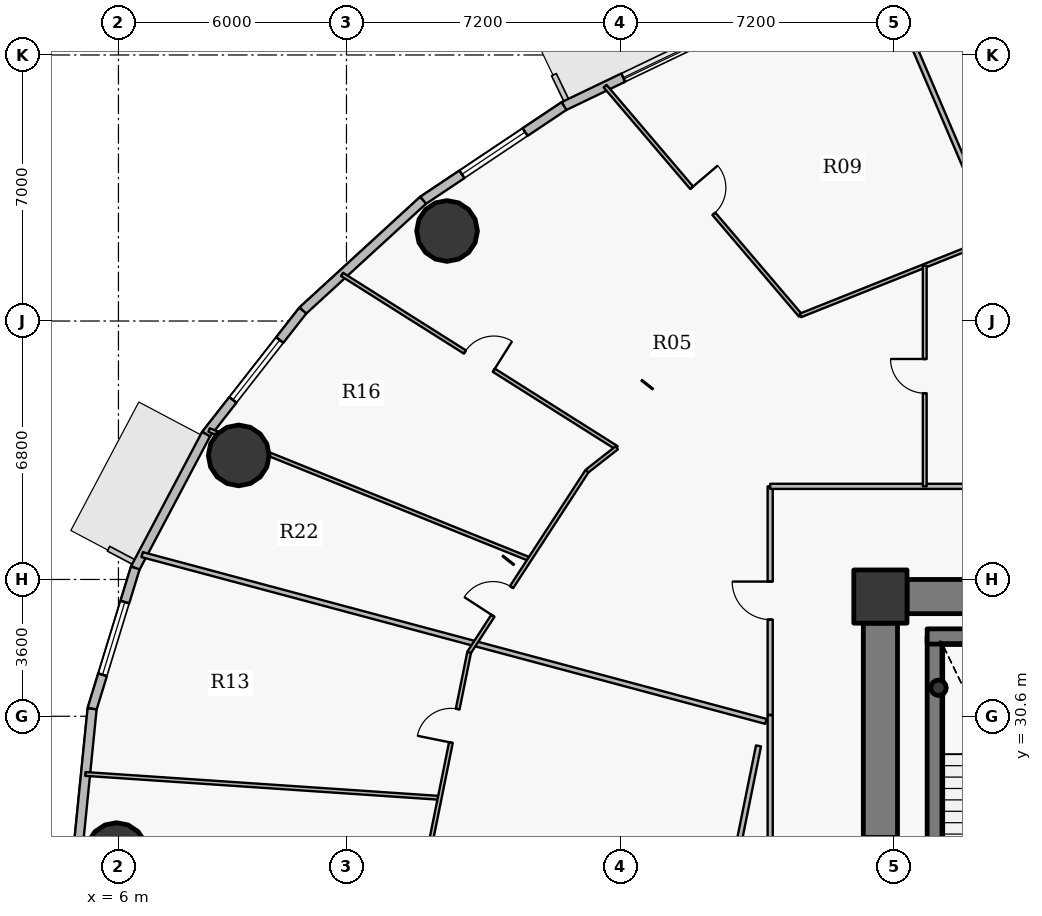
"""IFC4 building model, lengths in metres.
Left out: names, types, materials, properties, quantities, classifications, styles, units other than length and angle.
Written with IfcOpenShell. Run it as: python <this file> out.ifc"""

import sys

from ifc_helpers import new_model, si_unit, direction, frame, frame_2d, origin, origin_2d, place, context, subcontext, project, spatial, rectangle, hollow_circle, extrude, source, transform, mapped, element, fill, save


model = new_model("IFC4")
c1 = context("Model", 3, precision=1e-05, world=origin(), true_north=direction((0.0, 1.0)))
c2 = subcontext(c1, "Body", "Model", "MODEL_VIEW")
j1 = project(units=[si_unit("LENGTHUNIT", "METRE"), si_unit("PLANEANGLEUNIT", "RADIAN")], contexts=[c1])
p1 = place(None, origin())
s1 = spatial("IfcSite", under=j1, at=p1, CompositionType="ELEMENT")
p2 = place(p1, origin())
s2 = spatial("IfcBuilding", under=s1, at=p2, CompositionType="ELEMENT")
p3 = place(p2, frame((0.0, 0.0, 70.2)))
s3 = spatial("IfcBuildingStorey", under=s2, at=p3, CompositionType="ELEMENT", Elevation=70.2)
p4 = place(p3, frame((26.05, 33.75, 0.0), z_axis=(0.0, 0.0, 1.0), x_axis=(1.0, 0.0, 0.0)))
e1 = element("IfcColumn", 1, at=p4, inside=s3, PredefinedType="COLUMN", context=c2, shape_type="SweptSolid", body=[
    extrude(rectangle(XDim=1.4, YDim=1.4, at=origin_2d()), origin(), (0.0, 0.0, 1.0), 4.2),
])
p5 = place(p3, frame((27.48, 24.1, 0.0), z_axis=(0.0, 0.0, 1.0), x_axis=(0.0, 1.0, 0.0)))
e2 = element("IfcWall", 2, at=p5, inside=s3, PredefinedType="SHEAR", context=c2, shape_type="SweptSolid", body=[
    extrude(rectangle(XDim=8.6, YDim=0.4, at=frame_2d((4.3, 0.0))), origin(), (0.0, 0.0, 1.0), 4.2),
])
p6 = place(p3, frame((27.28, 32.7, 0.0), z_axis=(0.0, 0.0, 1.0), x_axis=(1.0, 0.0, 0.0)))
e3 = element("IfcWall", 3, at=p6, inside=s3, PredefinedType="SHEAR", context=c2, shape_type="SweptSolid", body=[
    extrude(rectangle(XDim=4.1, YDim=0.4, at=frame_2d((2.05, 0.0))), origin(), (0.0, 0.0, 1.0), 4.2),
])
p7 = place(p3, frame((27.58, 31.35, 0.0), z_axis=(0.0, 0.0, 1.0), x_axis=(1.0, 0.0, 0.0)))
e4 = element("IfcColumn", 4, at=p7, inside=s3, PredefinedType="COLUMN", context=c2, shape_type="SweptSolid", body=[
    extrude(hollow_circle(Radius=0.203, WallThickness=0.016, at=origin_2d()), origin(), (0.0, 0.0, 1.0), 4.2),
])
p8 = place(p3, frame((26.75, 33.75, 0.0), z_axis=(0.0, 0.0, 1.0), x_axis=(1.0, 0.0, 0.0)))
e5 = element("IfcWall", 5, at=p8, inside=s3, PredefinedType="SHEAR", context=c2, shape_type="SweptSolid", body=[
    extrude(rectangle(XDim=18.5, YDim=0.9, at=frame_2d((9.25, 0.0))), origin(), (0.0, 0.0, 1.0), 3.4),
])
p9 = place(p3, frame((26.05, 20.95, 0.0), z_axis=(0.0, 0.0, 1.0), x_axis=(0.0, 1.0, 0.0)))
e6 = element("IfcWall", 6, at=p9, inside=s3, PredefinedType="SHEAR", context=c2, shape_type="SweptSolid", body=[
    extrude(rectangle(XDim=12.1, YDim=0.9, at=frame_2d((6.05, 0.0))), origin(), (0.0, 0.0, 1.0), 3.4),
])
p10 = place(p9, frame((5.64, 0.0, 0.0)))
e7 = element("IfcOpeningElement", 7, at=p10, cuts=e6, PredefinedType="OPENING", context=c2, shape_type="SweptSolid", body=[
    extrude(rectangle(XDim=0.82, YDim=2.1, at=origin_2d()), frame((0.41, 0.46, 1.05), z_axis=(0.0, -1.0, 0.0), x_axis=(1.0, 0.0, 0.0)), (0.0, 0.0, 1.0), 0.92),
])
for number, where, z_axis, x_axis in (
    (8, (14.647, 43.369, 0.0), (0.0, 0.0, 1.0), (1.0, 0.0, 0.0)),
    (9, (9.165, 37.464, 0.0), (0.0, 0.0, 1.0), (1.0, 0.0, 0.0)),
    (10, (5.95, 27.0, 0.0), (0.0, 0.0, 1.0), (1.0, 0.0, 0.0)),
):
    element("IfcColumn", number, at=place(p3, frame(where, z_axis=z_axis, x_axis=x_axis)), inside=s3, PredefinedType="COLUMN", context=c2, shape_type="SweptSolid", body=[
        extrude(hollow_circle(Radius=0.8, WallThickness=0.045, at=origin_2d()), origin(), (0.0, 0.0, 1.0), 4.2),
    ])
p11 = place(p3, frame((17.723, 46.656, 0.0), z_axis=(0.0, 0.0, 1.0), x_axis=(0.901601503137, 0.432567601123, 0.0)))
e11 = element("IfcWall", 11, at=p11, inside=s3, PredefinedType="SOLIDWALL", context=c2, shape_type="SweptSolid", body=[
    extrude(rectangle(XDim=4.613, YDim=0.24, at=frame_2d((2.306, 0.0))), origin(), (0.0, 0.0, 1.0), 3.95),
])
p12 = place(p11, frame((1.731, 0.0, 0.9)))
e12 = element("IfcOpeningElement", 12, at=p12, cuts=e11, PredefinedType="OPENING", context=c2, shape_type="SweptSolid", body=[
    extrude(rectangle(XDim=2.0, YDim=1.75, at=origin_2d()), frame((1.0, 0.13, 0.875), z_axis=(0.0, -1.0, 0.0), x_axis=(1.0, 0.0, 0.0)), (0.0, 0.0, 1.0), 0.26),
])
p13 = place(p3, frame((14.015, 44.176, 0.0), z_axis=(0.0, 0.0, 1.0), x_axis=(0.831240982525, 0.555912249343, 0.0)))
e13 = element("IfcWall", 13, at=p13, inside=s3, PredefinedType="SOLIDWALL", context=c2, shape_type="SweptSolid", body=[
    extrude(rectangle(XDim=4.46, YDim=0.24, at=frame_2d((2.23, 0.0))), origin(), (0.0, 0.0, 1.0), 3.95),
])
p14 = place(p13, frame((1.23, 0.0, 0.9)))
e14 = element("IfcOpeningElement", 14, at=p14, cuts=e13, PredefinedType="OPENING", context=c2, shape_type="SweptSolid", body=[
    extrude(rectangle(XDim=2.0, YDim=1.75, at=origin_2d()), frame((1.0, 0.13, 0.875), z_axis=(0.0, -1.0, 0.0), x_axis=(1.0, 0.0, 0.0)), (0.0, 0.0, 1.0), 0.26),
])
p15 = place(p3, frame((10.85, 41.275, 0.0), z_axis=(0.0, 0.0, 1.0), x_axis=(0.737116376281, 0.67576582321, 0.0)))
e15 = element("IfcWall", 15, at=p15, inside=s3, PredefinedType="SOLIDWALL", context=c2, shape_type="SweptSolid", body=[
    extrude(rectangle(XDim=4.294, YDim=0.24, at=frame_2d((2.147, 0.0))), origin(), (0.0, 0.0, 1.0), 3.95),
])
p16 = place(p3, frame((8.305, 38.023, 0.0), z_axis=(0.0, 0.0, 1.0), x_axis=(0.616295508253, 0.787514981767, 0.0)))
e16 = element("IfcWall", 16, at=p16, inside=s3, PredefinedType="SOLIDWALL", context=c2, shape_type="SweptSolid", body=[
    extrude(rectangle(XDim=4.129, YDim=0.24, at=frame_2d((2.065, 0.0))), origin(), (0.0, 0.0, 1.0), 3.95),
])
p17 = place(p16, frame((1.146, 0.0, 0.9)))
e17 = element("IfcOpeningElement", 17, at=p17, cuts=e16, PredefinedType="OPENING", context=c2, shape_type="SweptSolid", body=[
    extrude(rectangle(XDim=2.0, YDim=1.75, at=origin_2d()), frame((1.0, 0.13, 0.875), z_axis=(0.0, -1.0, 0.0), x_axis=(1.0, 0.0, 0.0)), (0.0, 0.0, 1.0), 0.26),
])
p18 = place(p3, frame((6.442, 34.501, 0.0), z_axis=(0.0, 0.0, 1.0), x_axis=(0.467662443071, 0.883907144072, 0.0)))
e18 = element("IfcWall", 18, at=p18, inside=s3, PredefinedType="SOLIDWALL", context=c2, shape_type="SweptSolid", body=[
    extrude(rectangle(XDim=3.984, YDim=0.24, at=frame_2d((1.992, 0.0))), origin(), (0.0, 0.0, 1.0), 3.95),
])
p19 = place(p3, frame((5.307, 30.797, 0.0), z_axis=(0.0, 0.0, 1.0), x_axis=(0.293111631758, 0.956078224482, 0.0)))
e19 = element("IfcWall", 19, at=p19, inside=s3, PredefinedType="SOLIDWALL", context=c2, shape_type="SweptSolid", body=[
    extrude(rectangle(XDim=3.875, YDim=0.24, at=frame_2d((1.938, 0.0))), origin(), (0.0, 0.0, 1.0), 3.95),
])
p20 = place(p19, frame((0.938, 0.0, 0.9)))
e20 = element("IfcOpeningElement", 20, at=p20, cuts=e19, PredefinedType="OPENING", context=c2, shape_type="SweptSolid", body=[
    extrude(rectangle(XDim=2.0, YDim=1.75, at=origin_2d()), frame((1.0, 0.13, 0.875), z_axis=(0.0, -1.0, 0.0), x_axis=(1.0, 0.0, 0.0)), (0.0, 0.0, 1.0), 0.26),
])
p21 = place(p3, frame((4.925, 27.0, 0.0), z_axis=(0.0, 0.0, 1.0), x_axis=(0.099997795174, 0.994987658698, 0.0)))
e21 = element("IfcWall", 21, at=p21, inside=s3, PredefinedType="SOLIDWALL", context=c2, shape_type="SweptSolid", body=[
    extrude(rectangle(XDim=3.816, YDim=0.24, at=frame_2d((1.908, 0.0))), origin(), (0.0, 0.0, 1.0), 3.95),
])
p22 = place(p3, frame((5.129, 29.083, 0.0), z_axis=(0.0, 0.0, 1.0), x_axis=(0.997731551972, -0.067318275369, 0.0)))
e22 = element("IfcWall", 22, at=p22, inside=s3, PredefinedType="PARTITIONING", context=c2, shape_type="SweptSolid", body=[
    extrude(rectangle(XDim=9.346, YDim=0.1, at=frame_2d((4.673, 0.0))), origin(), (0.0, 0.0, 1.0), 3.335),
])
p23 = place(p3, frame((6.623, 34.854, 0.0), z_axis=(0.0, 0.0, 1.0), x_axis=(0.966073053026, -0.258268961003, 0.0)))
e23 = element("IfcWall", 23, at=p23, inside=s3, PredefinedType="PARTITIONING", context=c2, shape_type="SweptSolid", body=[
    extrude(rectangle(XDim=16.991, YDim=0.135, at=frame_2d((8.495, 0.0))), origin(), (0.0, 0.0, 1.0), 3.335),
])
p24 = place(p3, frame((8.385, 38.132, 0.0), z_axis=(0.0, 0.0, 1.0), x_axis=(0.927473750459, -0.373888275037, 0.0)))
e24 = element("IfcWall", 24, at=p24, inside=s3, PredefinedType="PARTITIONING", context=c2, shape_type="SweptSolid", body=[
    extrude(rectangle(XDim=9.096, YDim=0.1, at=frame_2d((4.548, 0.0))), origin(), (0.0, 0.0, 1.0), 3.285),
])
p25 = place(p3, frame((11.882, 42.228, 0.0), z_axis=(0.0, 0.0, 1.0), x_axis=(0.845549287721, -0.533897370319, 0.0)))
e25 = element("IfcWall", 25, at=p25, inside=s3, PredefinedType="PARTITIONING", context=c2, shape_type="SweptSolid", body=[
    extrude(rectangle(XDim=8.55, YDim=0.1, at=frame_2d((4.275, 0.0))), origin(), (0.0, 0.0, 1.0), 3.335),
])
p26 = place(p25, frame((3.825, 0.0, 0.0)))
e26 = element("IfcOpeningElement", 26, at=p26, cuts=e25, PredefinedType="OPENING", context=c2, shape_type="SweptSolid", body=[
    extrude(rectangle(XDim=0.9, YDim=2.1, at=origin_2d()), frame((0.45, 0.06, 1.05), z_axis=(0.0, -1.0, 0.0), x_axis=(1.0, 0.0, 0.0)), (0.0, 0.0, 1.0), 0.12),
])
p27 = place(p3, frame((14.16, 27.0, 0.0), z_axis=(0.0, 0.0, 1.0), x_axis=(0.198292702032, 0.980142848936, 0.0)))
e27 = element("IfcWall", 27, at=p27, inside=s3, PredefinedType="PARTITIONING", context=c2, shape_type="SweptSolid", body=[
    extrude(rectangle(XDim=5.392, YDim=0.1, at=frame_2d((2.696, 0.0))), origin(), (0.0, 0.0, 1.0), 3.285),
])
p28 = place(p27, frame((2.967, 0.0, 0.0)))
e28 = element("IfcOpeningElement", 28, at=p28, cuts=e27, PredefinedType="OPENING", context=c2, shape_type="SweptSolid", body=[
    extrude(rectangle(XDim=0.9, YDim=2.1, at=origin_2d()), frame((0.45, 0.06, 1.05), z_axis=(0.0, -1.0, 0.0), x_axis=(1.0, 0.0, 0.0)), (0.0, 0.0, 1.0), 0.12),
])
p29 = place(p3, frame((15.229, 32.284, 0.0), z_axis=(0.0, 0.0, 1.0), x_axis=(0.545394142426, 0.83817971188, 0.0)))
e29 = element("IfcWall", 29, at=p29, inside=s3, PredefinedType="PARTITIONING", context=c2, shape_type="SweptSolid", body=[
    extrude(rectangle(XDim=5.688, YDim=0.1, at=frame_2d((2.844, 0.0))), origin(), (0.0, 0.0, 1.0), 3.285),
])
p30 = place(p29, frame((1.146, 0.0, 0.0)))
e30 = element("IfcOpeningElement", 30, at=p30, cuts=e29, PredefinedType="OPENING", context=c2, shape_type="SweptSolid", body=[
    extrude(rectangle(XDim=0.9, YDim=2.1, at=origin_2d()), frame((0.45, 0.06, 1.05), z_axis=(0.0, -1.0, 0.0), x_axis=(1.0, 0.0, 0.0)), (0.0, 0.0, 1.0), 0.12),
])
p31 = place(p3, frame((18.331, 37.052, 0.0), z_axis=(0.0, 0.0, 1.0), x_axis=(0.787385450927, 0.616460989575, 0.0)))
e31 = element("IfcWall", 31, at=p31, inside=s3, PredefinedType="PARTITIONING", context=c2, shape_type="SweptSolid", body=[
    extrude(rectangle(XDim=0.991, YDim=0.1, at=frame_2d((0.496, 0.0))), origin(), (0.0, 0.0, 1.0), 3.435),
])
p32 = place(p3, frame((18.805, 47.181, 0.0), z_axis=(0.0, 0.0, 1.0), x_axis=(0.648556358155, -0.761166637667, 0.0)))
e32 = element("IfcWall", 32, at=p32, inside=s3, PredefinedType="PARTITIONING", context=c2, shape_type="SweptSolid", body=[
    extrude(rectangle(XDim=7.926, YDim=0.1, at=frame_2d((3.963, 0.0))), origin(), (0.0, 0.0, 1.0), 3.335),
])
p33 = place(p32, frame((3.513, 0.0, 0.0)))
e33 = element("IfcOpeningElement", 33, at=p33, cuts=e32, PredefinedType="OPENING", context=c2, shape_type="SweptSolid", body=[
    extrude(rectangle(XDim=0.9, YDim=2.1, at=origin_2d()), frame((0.45, 0.06, 1.05), z_axis=(0.0, -1.0, 0.0), x_axis=(1.0, 0.0, 0.0)), (0.0, 0.0, 1.0), 0.12),
])
p34 = place(p3, frame((23.15, 30.638, 0.0), z_axis=(0.0, 0.0, 1.0), x_axis=(0.0, 1.0, 0.0)))
e34 = element("IfcWall", 34, at=p34, inside=s3, PredefinedType="PARTITIONING", context=c2, shape_type="SweptSolid", body=[
    extrude(rectangle(XDim=6.011, YDim=0.135, at=frame_2d((3.006, 0.0))), origin(), (0.0, 0.0, 1.0), 3.285),
])
p35 = place(p34, frame((2.506, 0.0, 0.0)))
e35 = element("IfcOpeningElement", 35, at=p35, cuts=e34, PredefinedType="OPENING", context=c2, shape_type="SweptSolid", body=[
    extrude(rectangle(XDim=1.0, YDim=2.15, at=origin_2d()), frame((0.5, 0.078, 1.075), z_axis=(0.0, -1.0, 0.0), x_axis=(1.0, 0.0, 0.0)), (0.0, 0.0, 1.0), 0.155),
])
p36 = place(p3, frame((23.15, 36.65, 0.0), z_axis=(0.0, 0.0, 1.0), x_axis=(1.0, 0.0, 0.0)))
e36 = element("IfcWall", 36, at=p36, inside=s3, PredefinedType="PARTITIONING", context=c2, shape_type="SweptSolid", body=[
    extrude(rectangle(XDim=7.171, YDim=0.135, at=frame_2d((3.586, 0.0))), origin(), (0.0, 0.0, 1.0), 3.285),
])
p37 = place(p3, frame((23.946, 41.147, 0.0), z_axis=(0.0, 0.0, 1.0), x_axis=(0.928805222761, 0.370568290834, 0.0)))
e37 = element("IfcWall", 37, at=p37, inside=s3, PredefinedType="PARTITIONING", context=c2, shape_type="SweptSolid", body=[
    extrude(rectangle(XDim=5.529, YDim=0.1, at=frame_2d((2.764, 0.0))), origin(), (0.0, 0.0, 1.0), 3.285),
])
p38 = place(p3, frame((26.156, 50.043, 0.0), z_axis=(0.0, 0.0, 1.0), x_axis=(0.392844637537, -0.919604855771, 0.0)))
e38 = element("IfcWall", 38, at=p38, inside=s3, PredefinedType="PARTITIONING", context=c2, shape_type="SweptSolid", body=[
    extrude(rectangle(XDim=13.987, YDim=0.135, at=frame_2d((6.993, 0.0))), origin(), (0.0, 0.0, 1.0), 3.285),
])
p39 = place(p3, frame((27.217, 36.65, 0.0), z_axis=(0.0, 0.0, 1.0), x_axis=(0.0, 1.0, 0.0)))
e39 = element("IfcWall", 39, at=p39, inside=s3, PredefinedType="PARTITIONING", context=c2, shape_type="SweptSolid", body=[
    extrude(rectangle(XDim=5.802, YDim=0.1, at=frame_2d((2.901, 0.0))), origin(), (0.0, 0.0, 1.0), 3.95),
])
p40 = place(p39, frame((2.451, 0.0, 0.0)))
e40 = element("IfcOpeningElement", 40, at=p40, cuts=e39, PredefinedType="OPENING", context=c2, shape_type="SweptSolid", body=[
    extrude(rectangle(XDim=0.9, YDim=2.1, at=origin_2d()), frame((0.45, 0.06, 1.05), z_axis=(0.0, -1.0, 0.0), x_axis=(1.0, 0.0, 0.0)), (0.0, 0.0, 1.0), 0.12),
])
p41 = place(p3, frame((23.15, 26.089, 0.0), z_axis=(0.0, 0.0, 1.0), x_axis=(0.0, 1.0, 0.0)))
e41 = element("IfcWall", 41, at=p41, inside=s3, PredefinedType="PARTITIONING", context=c2, shape_type="SweptSolid", body=[
    extrude(rectangle(XDim=4.539, YDim=0.135, at=frame_2d((2.27, 0.0))), origin(), (0.0, 0.0, 1.0), 3.285),
])
p42 = place(p3, frame((26.74, 34.2, 0.0), z_axis=(0.0, 0.0, 1.0), x_axis=(-1.0, 0.0, 0.0)))
e42 = element("IfcWall", 42, at=p42, inside=s3, PredefinedType="PARTITIONING", context=c2, shape_type="SweptSolid", body=[
    extrude(rectangle(XDim=1.14, YDim=0.135, at=frame_2d((0.57, 0.0))), origin(), (0.0, 0.0, 1.0), 3.285),
])
p43 = place(p3, frame((25.6, 33.893, 0.0), z_axis=(0.0, 0.0, 1.0), x_axis=(0.0, -1.0, 0.0)))
e43 = element("IfcWall", 43, at=p43, inside=s3, PredefinedType="PARTITIONING", context=c2, shape_type="SweptSolid", body=[
    extrude(rectangle(XDim=0.833, YDim=0.135, at=frame_2d((0.416, 0.0))), origin(), (0.0, 0.0, 1.0), 3.95),
])
p44 = place(p3, frame((22.843, 29.82, 0.0), z_axis=(0.0, 0.0, 1.0), x_axis=(-0.19828576171, -0.980144253007, 0.0)))
e44 = element("IfcWall", 44, at=p44, inside=s3, PredefinedType="PARTITIONING", context=c2, shape_type="SweptSolid", body=[
    extrude(rectangle(XDim=2.877, YDim=0.135, at=frame_2d((1.439, 0.0))), origin(), (0.0, 0.0, 1.0), 3.285),
])
m1 = source(origin(), c2, "Body", "SweptSolid", [
    extrude(rectangle(XDim=2.0, YDim=1.75, at=origin_2d()), frame((1.0, 0.03, 0.875), z_axis=(0.0, -1.0, 0.0), x_axis=(1.0, 0.0, 0.0)), (0.0, 0.0, 1.0), 0.06),
])
p45 = place(p12, origin())
e45 = element("IfcWindow", 45, at=p45, inside=s3, PartitioningType="DOUBLE_PANEL_VERTICAL", PredefinedType="WINDOW", context=c2, shape_type="MappedRepresentation", body=[
    mapped(m1, transform((0.0, 0.0, 0.0), x_axis=(1.0, 0.0, 0.0), y_axis=(0.0, 1.0, 0.0), z_axis=(0.0, 0.0, 1.0), scale=1.0)),
])
fill(e12, e45)
p46 = place(p14, origin())
e46 = element("IfcWindow", 46, at=p46, inside=s3, PartitioningType="DOUBLE_PANEL_VERTICAL", PredefinedType="WINDOW", context=c2, shape_type="MappedRepresentation", body=[
    mapped(m1, transform((0.0, 0.0, 0.0), x_axis=(1.0, 0.0, 0.0), y_axis=(0.0, 1.0, 0.0), z_axis=(0.0, 0.0, 1.0), scale=1.0)),
])
fill(e14, e46)
p47 = place(p17, origin())
e47 = element("IfcWindow", 47, at=p47, inside=s3, PartitioningType="DOUBLE_PANEL_VERTICAL", PredefinedType="WINDOW", context=c2, shape_type="MappedRepresentation", body=[
    mapped(m1, transform((0.0, 0.0, 0.0), x_axis=(1.0, 0.0, 0.0), y_axis=(0.0, 1.0, 0.0), z_axis=(0.0, 0.0, 1.0), scale=1.0)),
])
fill(e17, e47)
p48 = place(p20, origin())
e48 = element("IfcWindow", 48, at=p48, inside=s3, PartitioningType="DOUBLE_PANEL_VERTICAL", PredefinedType="WINDOW", context=c2, shape_type="MappedRepresentation", body=[
    mapped(m1, transform((0.0, 0.0, 0.0), x_axis=(1.0, 0.0, 0.0), y_axis=(0.0, 1.0, 0.0), z_axis=(0.0, 0.0, 1.0), scale=1.0)),
])
fill(e20, e48)
m2 = source(origin(), c2, "Body", "SweptSolid", [
    extrude(rectangle(XDim=1.0, YDim=2.15, at=origin_2d()), frame((0.5, 0.025, 1.075), z_axis=(0.0, -1.0, 0.0), x_axis=(1.0, 0.0, 0.0)), (0.0, 0.0, 1.0), 0.05),
])
p49 = place(p35, origin())
e49 = element("IfcDoor", 49, at=p49, inside=s3, OperationType="SINGLE_SWING_RIGHT", PredefinedType="DOOR", context=c2, shape_type="MappedRepresentation", body=[
    mapped(m2, transform((0.0, 0.0, 0.0), x_axis=(1.0, 0.0, 0.0), y_axis=(0.0, 1.0, 0.0), z_axis=(0.0, 0.0, 1.0), scale=1.0)),
])
fill(e35, e49)
m3 = source(origin(), c2, "Body", "SweptSolid", [
    extrude(rectangle(XDim=0.9, YDim=2.1, at=origin_2d()), frame((0.45, 0.025, 1.05), z_axis=(0.0, -1.0, 0.0), x_axis=(1.0, 0.0, 0.0)), (0.0, 0.0, 1.0), 0.05),
])
p50 = place(p33, origin())
e50 = element("IfcDoor", 50, at=p50, inside=s3, OperationType="SINGLE_SWING_LEFT", PredefinedType="DOOR", context=c2, shape_type="MappedRepresentation", body=[
    mapped(m3, transform((0.0, 0.0, 0.0), x_axis=(1.0, 0.0, 0.0), y_axis=(0.0, 1.0, 0.0), z_axis=(0.0, 0.0, 1.0), scale=1.0)),
])
fill(e33, e50)
p51 = place(p26, origin())
e51 = element("IfcDoor", 51, at=p51, inside=s3, OperationType="SINGLE_SWING_RIGHT", PredefinedType="DOOR", context=c2, shape_type="MappedRepresentation", body=[
    mapped(m3, transform((0.0, 0.0, 0.0), x_axis=(1.0, 0.0, 0.0), y_axis=(0.0, 1.0, 0.0), z_axis=(0.0, 0.0, 1.0), scale=1.0)),
])
fill(e26, e51)
p52 = place(p30, origin())
e52 = element("IfcDoor", 52, at=p52, inside=s3, OperationType="SINGLE_SWING_LEFT", PredefinedType="DOOR", context=c2, shape_type="MappedRepresentation", body=[
    mapped(m3, transform((0.0, 0.0, 0.0), x_axis=(1.0, 0.0, 0.0), y_axis=(0.0, 1.0, 0.0), z_axis=(0.0, 0.0, 1.0), scale=1.0)),
])
fill(e30, e52)
p53 = place(p40, origin())
e53 = element("IfcDoor", 53, at=p53, inside=s3, OperationType="SINGLE_SWING_RIGHT", PredefinedType="DOOR", context=c2, shape_type="MappedRepresentation", body=[
    mapped(m3, transform((0.0, 0.0, 0.0), x_axis=(1.0, 0.0, 0.0), y_axis=(0.0, 1.0, 0.0), z_axis=(0.0, 0.0, 1.0), scale=1.0)),
])
fill(e40, e53)
p54 = place(p28, origin())
e54 = element("IfcDoor", 54, at=p54, inside=s3, OperationType="SINGLE_SWING_LEFT", PredefinedType="DOOR", context=c2, shape_type="MappedRepresentation", body=[
    mapped(m3, transform((0.0, 0.0, 0.0), x_axis=(1.0, 0.0, 0.0), y_axis=(0.0, 1.0, 0.0), z_axis=(0.0, 0.0, 1.0), scale=1.0)),
])
fill(e28, e54)
save(model, sys.argv[1])
